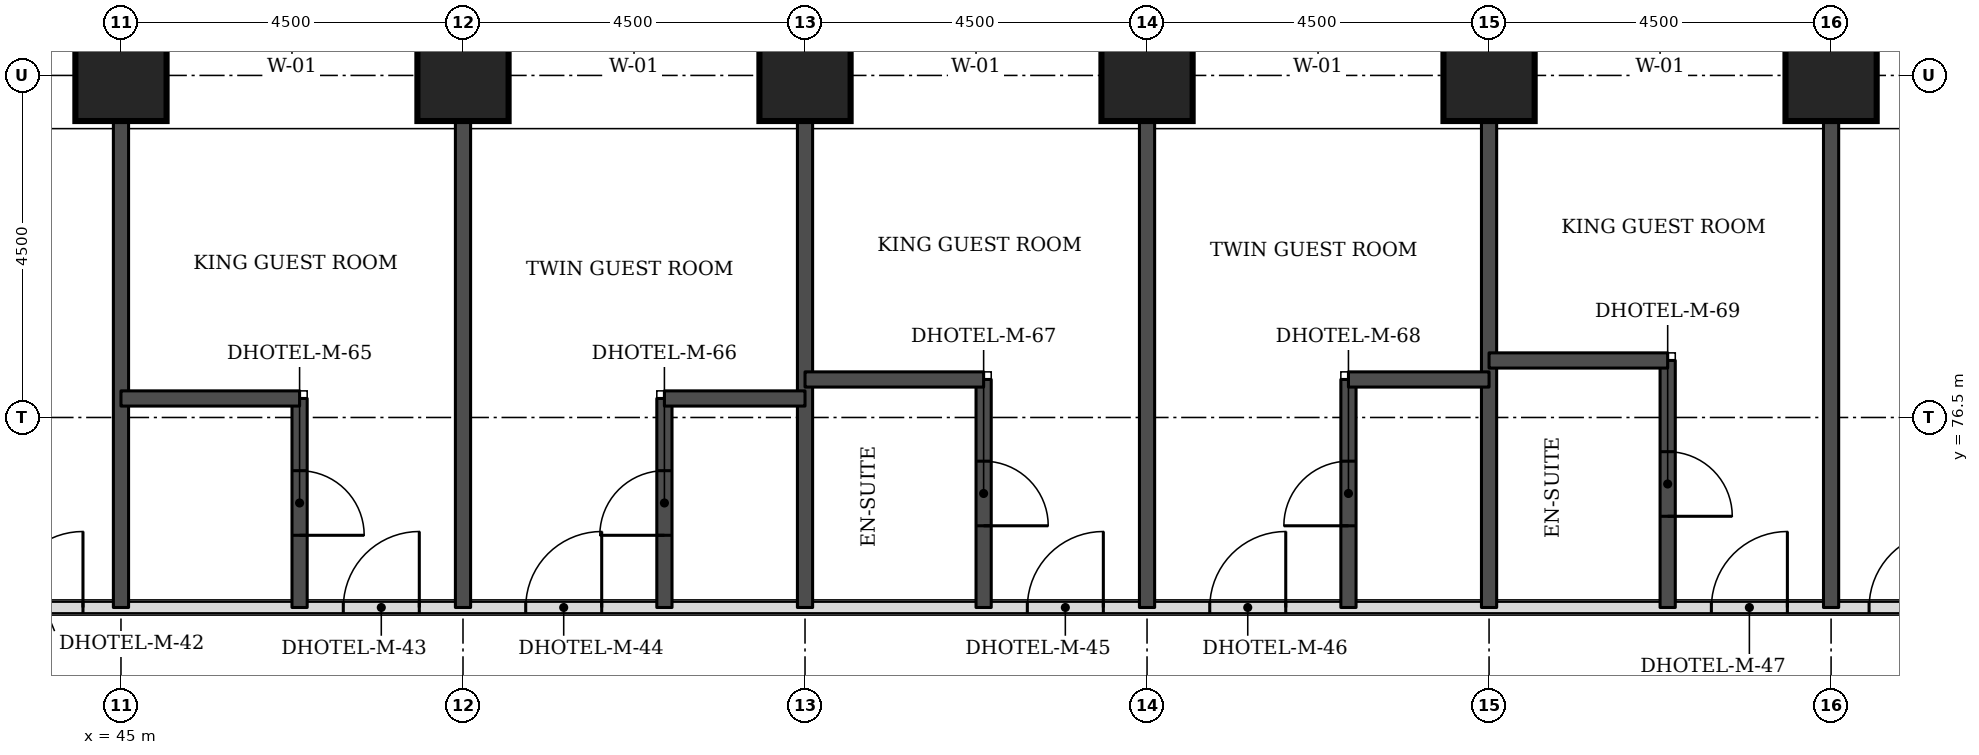
"""IFC4 building model, lengths in metres.
Left out: names, types, materials, properties, quantities, classifications, styles, units other than length and angle.
Written with IfcOpenShell. Run it as: python <this file> out.ifc"""

import sys

from ifc_helpers import new_model, si_unit, direction, frame, frame_2d, origin, origin_2d, place, context, subcontext, project, spatial, rectangle, extrude, element, fill, save


model = new_model("IFC4")
c1 = context("Model", 3, precision=1e-05, world=origin(), true_north=direction((0.0, 1.0)))
c2 = subcontext(c1, "Body", "Model", "MODEL_VIEW")
j1 = project(units=[si_unit("LENGTHUNIT", "METRE"), si_unit("PLANEANGLEUNIT", "RADIAN")], contexts=[c1])
p1 = place(None, origin())
s1 = spatial("IfcSite", under=j1, at=p1, CompositionType="ELEMENT")
p2 = place(p1, origin())
s2 = spatial("IfcBuilding", under=s1, at=p2, CompositionType="ELEMENT")
p3 = place(p2, frame((0.0, 0.0, 23.1)))
s3 = spatial("IfcBuildingStorey", under=s2, at=p3, CompositionType="ELEMENT", Elevation=23.1)
for number, where, z_axis, x_axis in (
    (1, (45.0, 81.0, 0.0), (0.0, 0.0, 1.0), (1.0, 0.0, 0.0)),
    (2, (49.5, 81.0, 0.0), (0.0, 0.0, 1.0), (1.0, 0.0, 0.0)),
    (3, (54.0, 81.0, 0.0), (0.0, 0.0, 1.0), (1.0, 0.0, 0.0)),
    (4, (58.5, 81.0, 0.0), (0.0, 0.0, 1.0), (1.0, 0.0, 0.0)),
    (5, (63.0, 81.0, 0.0), (0.0, 0.0, 1.0), (1.0, 0.0, 0.0)),
    (6, (67.5, 81.0, 0.0), (0.0, 0.0, 1.0), (1.0, 0.0, 0.0)),
):
    element("IfcColumn", number, at=place(p3, frame(where, z_axis=z_axis, x_axis=x_axis)), inside=s3, PredefinedType="COLUMN", context=c2, shape_type="SweptSolid", body=[
        extrude(rectangle(XDim=1.2, YDim=1.2, at=origin_2d()), origin(), (0.0, 0.0, 1.0), 3.3),
    ])
p4 = place(p3, frame((43.0, 74.0, 0.0), z_axis=(0.0, 0.0, 1.0), x_axis=(1.0, 0.0, 0.0)))
e7 = element("IfcWall", 7, at=p4, inside=s3, PredefinedType="PARTITIONING", context=c2, shape_type="SweptSolid", body=[
    extrude(rectangle(XDim=26.5, YDim=0.15, at=frame_2d((13.25, 0.0))), origin(), (0.0, 0.0, 1.0), 3.08),
])
p5 = place(p4, frame((4.925, 0.0, 0.0)))
e8 = element("IfcOpeningElement", 8, at=p5, cuts=e7, PredefinedType="OPENING", context=c2, shape_type="SweptSolid", body=[
    extrude(rectangle(XDim=1.0, YDim=2.1, at=frame_2d((0.5, 1.05))), frame((0.0, 0.085, 0.0), z_axis=(0.0, -1.0, 0.0), x_axis=(1.0, 0.0, 0.0)), (0.0, 0.0, 1.0), 0.17),
])
p6 = place(p4, frame((7.325, 0.0, 0.0)))
e9 = element("IfcOpeningElement", 9, at=p6, cuts=e7, PredefinedType="OPENING", context=c2, shape_type="SweptSolid", body=[
    extrude(rectangle(XDim=1.0, YDim=2.1, at=frame_2d((0.5, 1.05))), frame((0.0, 0.085, 0.0), z_axis=(0.0, -1.0, 0.0), x_axis=(1.0, 0.0, 0.0)), (0.0, 0.0, 1.0), 0.17),
])
p7 = place(p4, frame((13.925, 0.0, 0.0)))
e10 = element("IfcOpeningElement", 10, at=p7, cuts=e7, PredefinedType="OPENING", context=c2, shape_type="SweptSolid", body=[
    extrude(rectangle(XDim=1.0, YDim=2.1, at=frame_2d((0.5, 1.05))), frame((0.0, 0.085, 0.0), z_axis=(0.0, -1.0, 0.0), x_axis=(1.0, 0.0, 0.0)), (0.0, 0.0, 1.0), 0.17),
])
p8 = place(p4, frame((16.325, 0.0, 0.0)))
e11 = element("IfcOpeningElement", 11, at=p8, cuts=e7, PredefinedType="OPENING", context=c2, shape_type="SweptSolid", body=[
    extrude(rectangle(XDim=1.0, YDim=2.1, at=frame_2d((0.5, 1.05))), frame((0.0, 0.085, 0.0), z_axis=(0.0, -1.0, 0.0), x_axis=(1.0, 0.0, 0.0)), (0.0, 0.0, 1.0), 0.17),
])
p9 = place(p4, frame((22.925, 0.0, 0.0)))
e12 = element("IfcOpeningElement", 12, at=p9, cuts=e7, PredefinedType="OPENING", context=c2, shape_type="SweptSolid", body=[
    extrude(rectangle(XDim=1.0, YDim=2.1, at=frame_2d((0.5, 1.05))), frame((0.0, 0.085, 0.0), z_axis=(0.0, -1.0, 0.0), x_axis=(1.0, 0.0, 0.0)), (0.0, 0.0, 1.0), 0.17),
])
p10 = place(p4, frame((0.5, 0.0, 0.0)))
e13 = element("IfcOpeningElement", 13, at=p10, cuts=e7, PredefinedType="OPENING", context=c2, shape_type="SweptSolid", body=[
    extrude(rectangle(XDim=1.0, YDim=2.1, at=frame_2d((0.5, 1.05))), frame((0.0, 0.085, 0.0), z_axis=(0.0, -1.0, 0.0), x_axis=(1.0, 0.0, 0.0)), (0.0, 0.0, 1.0), 0.17),
])
p11 = place(p4, frame((25.0, 0.0, 0.0)))
e14 = element("IfcOpeningElement", 14, at=p11, cuts=e7, PredefinedType="OPENING", context=c2, shape_type="SweptSolid", body=[
    extrude(rectangle(XDim=1.0, YDim=2.1, at=frame_2d((0.5, 1.05))), frame((0.0, 0.085, 0.0), z_axis=(0.0, -1.0, 0.0), x_axis=(1.0, 0.0, 0.0)), (0.0, 0.0, 1.0), 0.17),
])
p12 = place(p3, frame((45.0, 74.0, 0.0), z_axis=(0.0, 0.0, 1.0), x_axis=(0.0, 1.0, 0.0)))
e15 = element("IfcWall", 15, at=p12, inside=s3, PredefinedType="SOLIDWALL", context=c2, shape_type="SweptSolid", body=[
    extrude(rectangle(XDim=6.4, YDim=0.2, at=frame_2d((3.2, 0.0))), origin(), (0.0, 0.0, 1.0), 3.08),
])
p13 = place(p3, frame((47.35, 74.0, 0.0), z_axis=(0.0, 0.0, 1.0), x_axis=(0.0, 1.0, 0.0)))
e16 = element("IfcWall", 16, at=p13, inside=s3, PredefinedType="SOLIDWALL", context=c2, shape_type="SweptSolid", body=[
    extrude(rectangle(XDim=2.75, YDim=0.2, at=frame_2d((1.375, 0.0))), origin(), (0.0, 0.0, 1.0), 3.08),
])
p14 = place(p13, frame((0.95, 0.0, 0.0)))
e17 = element("IfcOpeningElement", 17, at=p14, cuts=e16, PredefinedType="OPENING", context=c2, shape_type="SweptSolid", body=[
    extrude(rectangle(XDim=0.85, YDim=2.1, at=frame_2d((0.425, 1.05))), frame((0.0, 0.11, 0.0), z_axis=(0.0, -1.0, 0.0), x_axis=(1.0, 0.0, 0.0)), (0.0, 0.0, 1.0), 0.22),
])
p15 = place(p3, frame((49.5, 74.0, 0.0), z_axis=(0.0, 0.0, 1.0), x_axis=(0.0, 1.0, 0.0)))
e18 = element("IfcWall", 18, at=p15, inside=s3, PredefinedType="SOLIDWALL", context=c2, shape_type="SweptSolid", body=[
    extrude(rectangle(XDim=6.4, YDim=0.2, at=frame_2d((3.2, 0.0))), origin(), (0.0, 0.0, 1.0), 3.08),
])
p16 = place(p3, frame((52.15, 74.0, 0.0), z_axis=(0.0, 0.0, 1.0), x_axis=(0.0, 1.0, 0.0)))
e19 = element("IfcWall", 19, at=p16, inside=s3, PredefinedType="SOLIDWALL", context=c2, shape_type="SweptSolid", body=[
    extrude(rectangle(XDim=2.75, YDim=0.2, at=frame_2d((1.375, 0.0))), origin(), (0.0, 0.0, 1.0), 3.08),
])
p17 = place(p16, frame((0.95, 0.0, 0.0)))
e20 = element("IfcOpeningElement", 20, at=p17, cuts=e19, PredefinedType="OPENING", context=c2, shape_type="SweptSolid", body=[
    extrude(rectangle(XDim=0.85, YDim=2.1, at=frame_2d((0.425, 1.05))), frame((0.0, 0.11, 0.0), z_axis=(0.0, -1.0, 0.0), x_axis=(1.0, 0.0, 0.0)), (0.0, 0.0, 1.0), 0.22),
])
p18 = place(p3, frame((54.0, 74.0, 0.0), z_axis=(0.0, 0.0, 1.0), x_axis=(0.0, 1.0, 0.0)))
e21 = element("IfcWall", 21, at=p18, inside=s3, PredefinedType="SOLIDWALL", context=c2, shape_type="SweptSolid", body=[
    extrude(rectangle(XDim=6.4, YDim=0.2, at=frame_2d((3.2, 0.0))), origin(), (0.0, 0.0, 1.0), 3.08),
])
p19 = place(p3, frame((56.35, 74.0, 0.0), z_axis=(0.0, 0.0, 1.0), x_axis=(0.0, 1.0, 0.0)))
e22 = element("IfcWall", 22, at=p19, inside=s3, PredefinedType="SOLIDWALL", context=c2, shape_type="SweptSolid", body=[
    extrude(rectangle(XDim=3.0, YDim=0.2, at=frame_2d((1.5, 0.0))), origin(), (0.0, 0.0, 1.0), 3.08),
])
p20 = place(p19, frame((1.075, 0.0, 0.0)))
e23 = element("IfcOpeningElement", 23, at=p20, cuts=e22, PredefinedType="OPENING", context=c2, shape_type="SweptSolid", body=[
    extrude(rectangle(XDim=0.85, YDim=2.1, at=frame_2d((0.425, 1.05))), frame((0.0, 0.11, 0.0), z_axis=(0.0, -1.0, 0.0), x_axis=(1.0, 0.0, 0.0)), (0.0, 0.0, 1.0), 0.22),
])
p21 = place(p3, frame((58.5, 74.0, 0.0), z_axis=(0.0, 0.0, 1.0), x_axis=(0.0, 1.0, 0.0)))
e24 = element("IfcWall", 24, at=p21, inside=s3, PredefinedType="SOLIDWALL", context=c2, shape_type="SweptSolid", body=[
    extrude(rectangle(XDim=6.4, YDim=0.2, at=frame_2d((3.2, 0.0))), origin(), (0.0, 0.0, 1.0), 3.08),
])
p22 = place(p3, frame((61.15, 74.0, 0.0), z_axis=(0.0, 0.0, 1.0), x_axis=(0.0, 1.0, 0.0)))
e25 = element("IfcWall", 25, at=p22, inside=s3, PredefinedType="SOLIDWALL", context=c2, shape_type="SweptSolid", body=[
    extrude(rectangle(XDim=3.0, YDim=0.2, at=frame_2d((1.5, 0.0))), origin(), (0.0, 0.0, 1.0), 3.08),
])
p23 = place(p22, frame((1.075, 0.0, 0.0)))
e26 = element("IfcOpeningElement", 26, at=p23, cuts=e25, PredefinedType="OPENING", context=c2, shape_type="SweptSolid", body=[
    extrude(rectangle(XDim=0.85, YDim=2.1, at=frame_2d((0.425, 1.05))), frame((0.0, 0.11, 0.0), z_axis=(0.0, -1.0, 0.0), x_axis=(1.0, 0.0, 0.0)), (0.0, 0.0, 1.0), 0.22),
])
p24 = place(p3, frame((63.0, 74.0, 0.0), z_axis=(0.0, 0.0, 1.0), x_axis=(0.0, 1.0, 0.0)))
e27 = element("IfcWall", 27, at=p24, inside=s3, PredefinedType="SOLIDWALL", context=c2, shape_type="SweptSolid", body=[
    extrude(rectangle(XDim=6.4, YDim=0.2, at=frame_2d((3.2, 0.0))), origin(), (0.0, 0.0, 1.0), 3.08),
])
p25 = place(p3, frame((65.35, 74.0, 0.0), z_axis=(0.0, 0.0, 1.0), x_axis=(0.0, 1.0, 0.0)))
e28 = element("IfcWall", 28, at=p25, inside=s3, PredefinedType="SOLIDWALL", context=c2, shape_type="SweptSolid", body=[
    extrude(rectangle(XDim=3.25, YDim=0.2, at=frame_2d((1.625, 0.0))), origin(), (0.0, 0.0, 1.0), 3.08),
])
p26 = place(p25, frame((1.2, 0.0, 0.0)))
e29 = element("IfcOpeningElement", 29, at=p26, cuts=e28, PredefinedType="OPENING", context=c2, shape_type="SweptSolid", body=[
    extrude(rectangle(XDim=0.85, YDim=2.1, at=frame_2d((0.425, 1.05))), frame((0.0, 0.11, 0.0), z_axis=(0.0, -1.0, 0.0), x_axis=(1.0, 0.0, 0.0)), (0.0, 0.0, 1.0), 0.22),
])
p27 = place(p3, frame((67.5, 74.0, 0.0), z_axis=(0.0, 0.0, 1.0), x_axis=(0.0, 1.0, 0.0)))
e30 = element("IfcWall", 30, at=p27, inside=s3, PredefinedType="SOLIDWALL", context=c2, shape_type="SweptSolid", body=[
    extrude(rectangle(XDim=6.4, YDim=0.2, at=frame_2d((3.2, 0.0))), origin(), (0.0, 0.0, 1.0), 3.08),
])
p28 = place(p3, frame((45.0, 76.75, 0.0), z_axis=(0.0, 0.0, 1.0), x_axis=(1.0, 0.0, 0.0)))
e31 = element("IfcWall", 31, at=p28, inside=s3, PredefinedType="SOLIDWALL", context=c2, shape_type="SweptSolid", body=[
    extrude(rectangle(XDim=2.35, YDim=0.2, at=frame_2d((1.175, 0.0))), origin(), (0.0, 0.0, 1.0), 3.08),
])
p29 = place(p3, frame((52.15, 76.75, 0.0), z_axis=(0.0, 0.0, 1.0), x_axis=(1.0, 0.0, 0.0)))
e32 = element("IfcWall", 32, at=p29, inside=s3, PredefinedType="SOLIDWALL", context=c2, shape_type="SweptSolid", body=[
    extrude(rectangle(XDim=1.85, YDim=0.2, at=frame_2d((0.925, 0.0))), origin(), (0.0, 0.0, 1.0), 3.08),
])
p30 = place(p3, frame((54.0, 77.0, 0.0), z_axis=(0.0, 0.0, 1.0), x_axis=(1.0, 0.0, 0.0)))
e33 = element("IfcWall", 33, at=p30, inside=s3, PredefinedType="SOLIDWALL", context=c2, shape_type="SweptSolid", body=[
    extrude(rectangle(XDim=2.35, YDim=0.2, at=frame_2d((1.175, 0.0))), origin(), (0.0, 0.0, 1.0), 3.08),
])
p31 = place(p3, frame((61.15, 77.0, 0.0), z_axis=(0.0, 0.0, 1.0), x_axis=(1.0, 0.0, 0.0)))
e34 = element("IfcWall", 34, at=p31, inside=s3, PredefinedType="SOLIDWALL", context=c2, shape_type="SweptSolid", body=[
    extrude(rectangle(XDim=1.85, YDim=0.2, at=frame_2d((0.925, 0.0))), origin(), (0.0, 0.0, 1.0), 3.08),
])
p32 = place(p3, frame((63.0, 77.25, 0.0), z_axis=(0.0, 0.0, 1.0), x_axis=(1.0, 0.0, 0.0)))
e35 = element("IfcWall", 35, at=p32, inside=s3, PredefinedType="SOLIDWALL", context=c2, shape_type="SweptSolid", body=[
    extrude(rectangle(XDim=2.35, YDim=0.2, at=frame_2d((1.175, 0.0))), origin(), (0.0, 0.0, 1.0), 3.08),
])
p33 = place(p5, origin())
e36 = element("IfcDoor", 36, at=p33, inside=s3, OperationType="SINGLE_SWING_RIGHT", PredefinedType="DOOR", context=c2, shape_type="SweptSolid", body=[
    extrude(rectangle(XDim=1.0, YDim=2.1, at=frame_2d((0.5, 1.05))), frame((0.0, 0.025, 0.0), z_axis=(0.0, -1.0, 0.0), x_axis=(1.0, 0.0, 0.0)), (0.0, 0.0, 1.0), 0.05),
])
fill(e8, e36)
p34 = place(p14, frame((0.85, 0.0, 0.0), z_axis=(0.0, 0.0, 1.0), x_axis=(-1.0, 0.0, 0.0)))
e37 = element("IfcDoor", 37, at=p34, inside=s3, OperationType="SINGLE_SWING_RIGHT", PredefinedType="DOOR", context=c2, shape_type="SweptSolid", body=[
    extrude(rectangle(XDim=0.85, YDim=2.1, at=frame_2d((0.425, 1.05))), frame((0.0, 0.025, 0.0), z_axis=(0.0, -1.0, 0.0), x_axis=(1.0, 0.0, 0.0)), (0.0, 0.0, 1.0), 0.05),
])
fill(e17, e37)
p35 = place(p6, origin())
e38 = element("IfcDoor", 38, at=p35, inside=s3, OperationType="SINGLE_SWING_RIGHT", PredefinedType="DOOR", context=c2, shape_type="SweptSolid", body=[
    extrude(rectangle(XDim=1.0, YDim=2.1, at=frame_2d((0.5, 1.05))), frame((0.0, 0.025, 0.0), z_axis=(0.0, -1.0, 0.0), x_axis=(1.0, 0.0, 0.0)), (0.0, 0.0, 1.0), 0.05),
])
fill(e9, e38)
p36 = place(p17, origin())
e39 = element("IfcDoor", 39, at=p36, inside=s3, OperationType="SINGLE_SWING_LEFT", PredefinedType="DOOR", context=c2, shape_type="SweptSolid", body=[
    extrude(rectangle(XDim=0.85, YDim=2.1, at=frame_2d((0.425, 1.05))), frame((0.0, 0.025, 0.0), z_axis=(0.0, -1.0, 0.0), x_axis=(1.0, 0.0, 0.0)), (0.0, 0.0, 1.0), 0.05),
])
fill(e20, e39)
p37 = place(p7, origin())
e40 = element("IfcDoor", 40, at=p37, inside=s3, OperationType="SINGLE_SWING_RIGHT", PredefinedType="DOOR", context=c2, shape_type="SweptSolid", body=[
    extrude(rectangle(XDim=1.0, YDim=2.1, at=frame_2d((0.5, 1.05))), frame((0.0, 0.025, 0.0), z_axis=(0.0, -1.0, 0.0), x_axis=(1.0, 0.0, 0.0)), (0.0, 0.0, 1.0), 0.05),
])
fill(e10, e40)
p38 = place(p20, frame((0.85, 0.0, 0.0), z_axis=(0.0, 0.0, 1.0), x_axis=(-1.0, 0.0, 0.0)))
e41 = element("IfcDoor", 41, at=p38, inside=s3, OperationType="SINGLE_SWING_RIGHT", PredefinedType="DOOR", context=c2, shape_type="SweptSolid", body=[
    extrude(rectangle(XDim=0.85, YDim=2.1, at=frame_2d((0.425, 1.05))), frame((0.0, 0.025, 0.0), z_axis=(0.0, -1.0, 0.0), x_axis=(1.0, 0.0, 0.0)), (0.0, 0.0, 1.0), 0.05),
])
fill(e23, e41)
p39 = place(p8, origin())
e42 = element("IfcDoor", 42, at=p39, inside=s3, OperationType="SINGLE_SWING_RIGHT", PredefinedType="DOOR", context=c2, shape_type="SweptSolid", body=[
    extrude(rectangle(XDim=1.0, YDim=2.1, at=frame_2d((0.5, 1.05))), frame((0.0, 0.025, 0.0), z_axis=(0.0, -1.0, 0.0), x_axis=(1.0, 0.0, 0.0)), (0.0, 0.0, 1.0), 0.05),
])
fill(e11, e42)
p40 = place(p23, origin())
e43 = element("IfcDoor", 43, at=p40, inside=s3, OperationType="SINGLE_SWING_LEFT", PredefinedType="DOOR", context=c2, shape_type="SweptSolid", body=[
    extrude(rectangle(XDim=0.85, YDim=2.1, at=frame_2d((0.425, 1.05))), frame((0.0, 0.025, 0.0), z_axis=(0.0, -1.0, 0.0), x_axis=(1.0, 0.0, 0.0)), (0.0, 0.0, 1.0), 0.05),
])
fill(e26, e43)
p41 = place(p9, origin())
e44 = element("IfcDoor", 44, at=p41, inside=s3, OperationType="SINGLE_SWING_RIGHT", PredefinedType="DOOR", context=c2, shape_type="SweptSolid", body=[
    extrude(rectangle(XDim=1.0, YDim=2.1, at=frame_2d((0.5, 1.05))), frame((0.0, 0.025, 0.0), z_axis=(0.0, -1.0, 0.0), x_axis=(1.0, 0.0, 0.0)), (0.0, 0.0, 1.0), 0.05),
])
fill(e12, e44)
p42 = place(p26, frame((0.85, 0.0, 0.0), z_axis=(0.0, 0.0, 1.0), x_axis=(-1.0, 0.0, 0.0)))
e45 = element("IfcDoor", 45, at=p42, inside=s3, OperationType="SINGLE_SWING_RIGHT", PredefinedType="DOOR", context=c2, shape_type="SweptSolid", body=[
    extrude(rectangle(XDim=0.85, YDim=2.1, at=frame_2d((0.425, 1.05))), frame((0.0, 0.025, 0.0), z_axis=(0.0, -1.0, 0.0), x_axis=(1.0, 0.0, 0.0)), (0.0, 0.0, 1.0), 0.05),
])
fill(e29, e45)
p43 = place(p10, origin())
e46 = element("IfcDoor", 46, at=p43, inside=s3, OperationType="SINGLE_SWING_RIGHT", PredefinedType="DOOR", context=c2, shape_type="SweptSolid", body=[
    extrude(rectangle(XDim=1.0, YDim=2.1, at=frame_2d((0.5, 1.05))), frame((0.0, 0.025, 0.0), z_axis=(0.0, -1.0, 0.0), x_axis=(1.0, 0.0, 0.0)), (0.0, 0.0, 1.0), 0.05),
])
fill(e13, e46)
p44 = place(p11, origin())
e47 = element("IfcDoor", 47, at=p44, inside=s3, OperationType="SINGLE_SWING_RIGHT", PredefinedType="DOOR", context=c2, shape_type="SweptSolid", body=[
    extrude(rectangle(XDim=1.0, YDim=2.1, at=frame_2d((0.5, 1.05))), frame((0.0, 0.025, 0.0), z_axis=(0.0, -1.0, 0.0), x_axis=(1.0, 0.0, 0.0)), (0.0, 0.0, 1.0), 0.05),
])
fill(e14, e47)
save(model, sys.argv[1])
